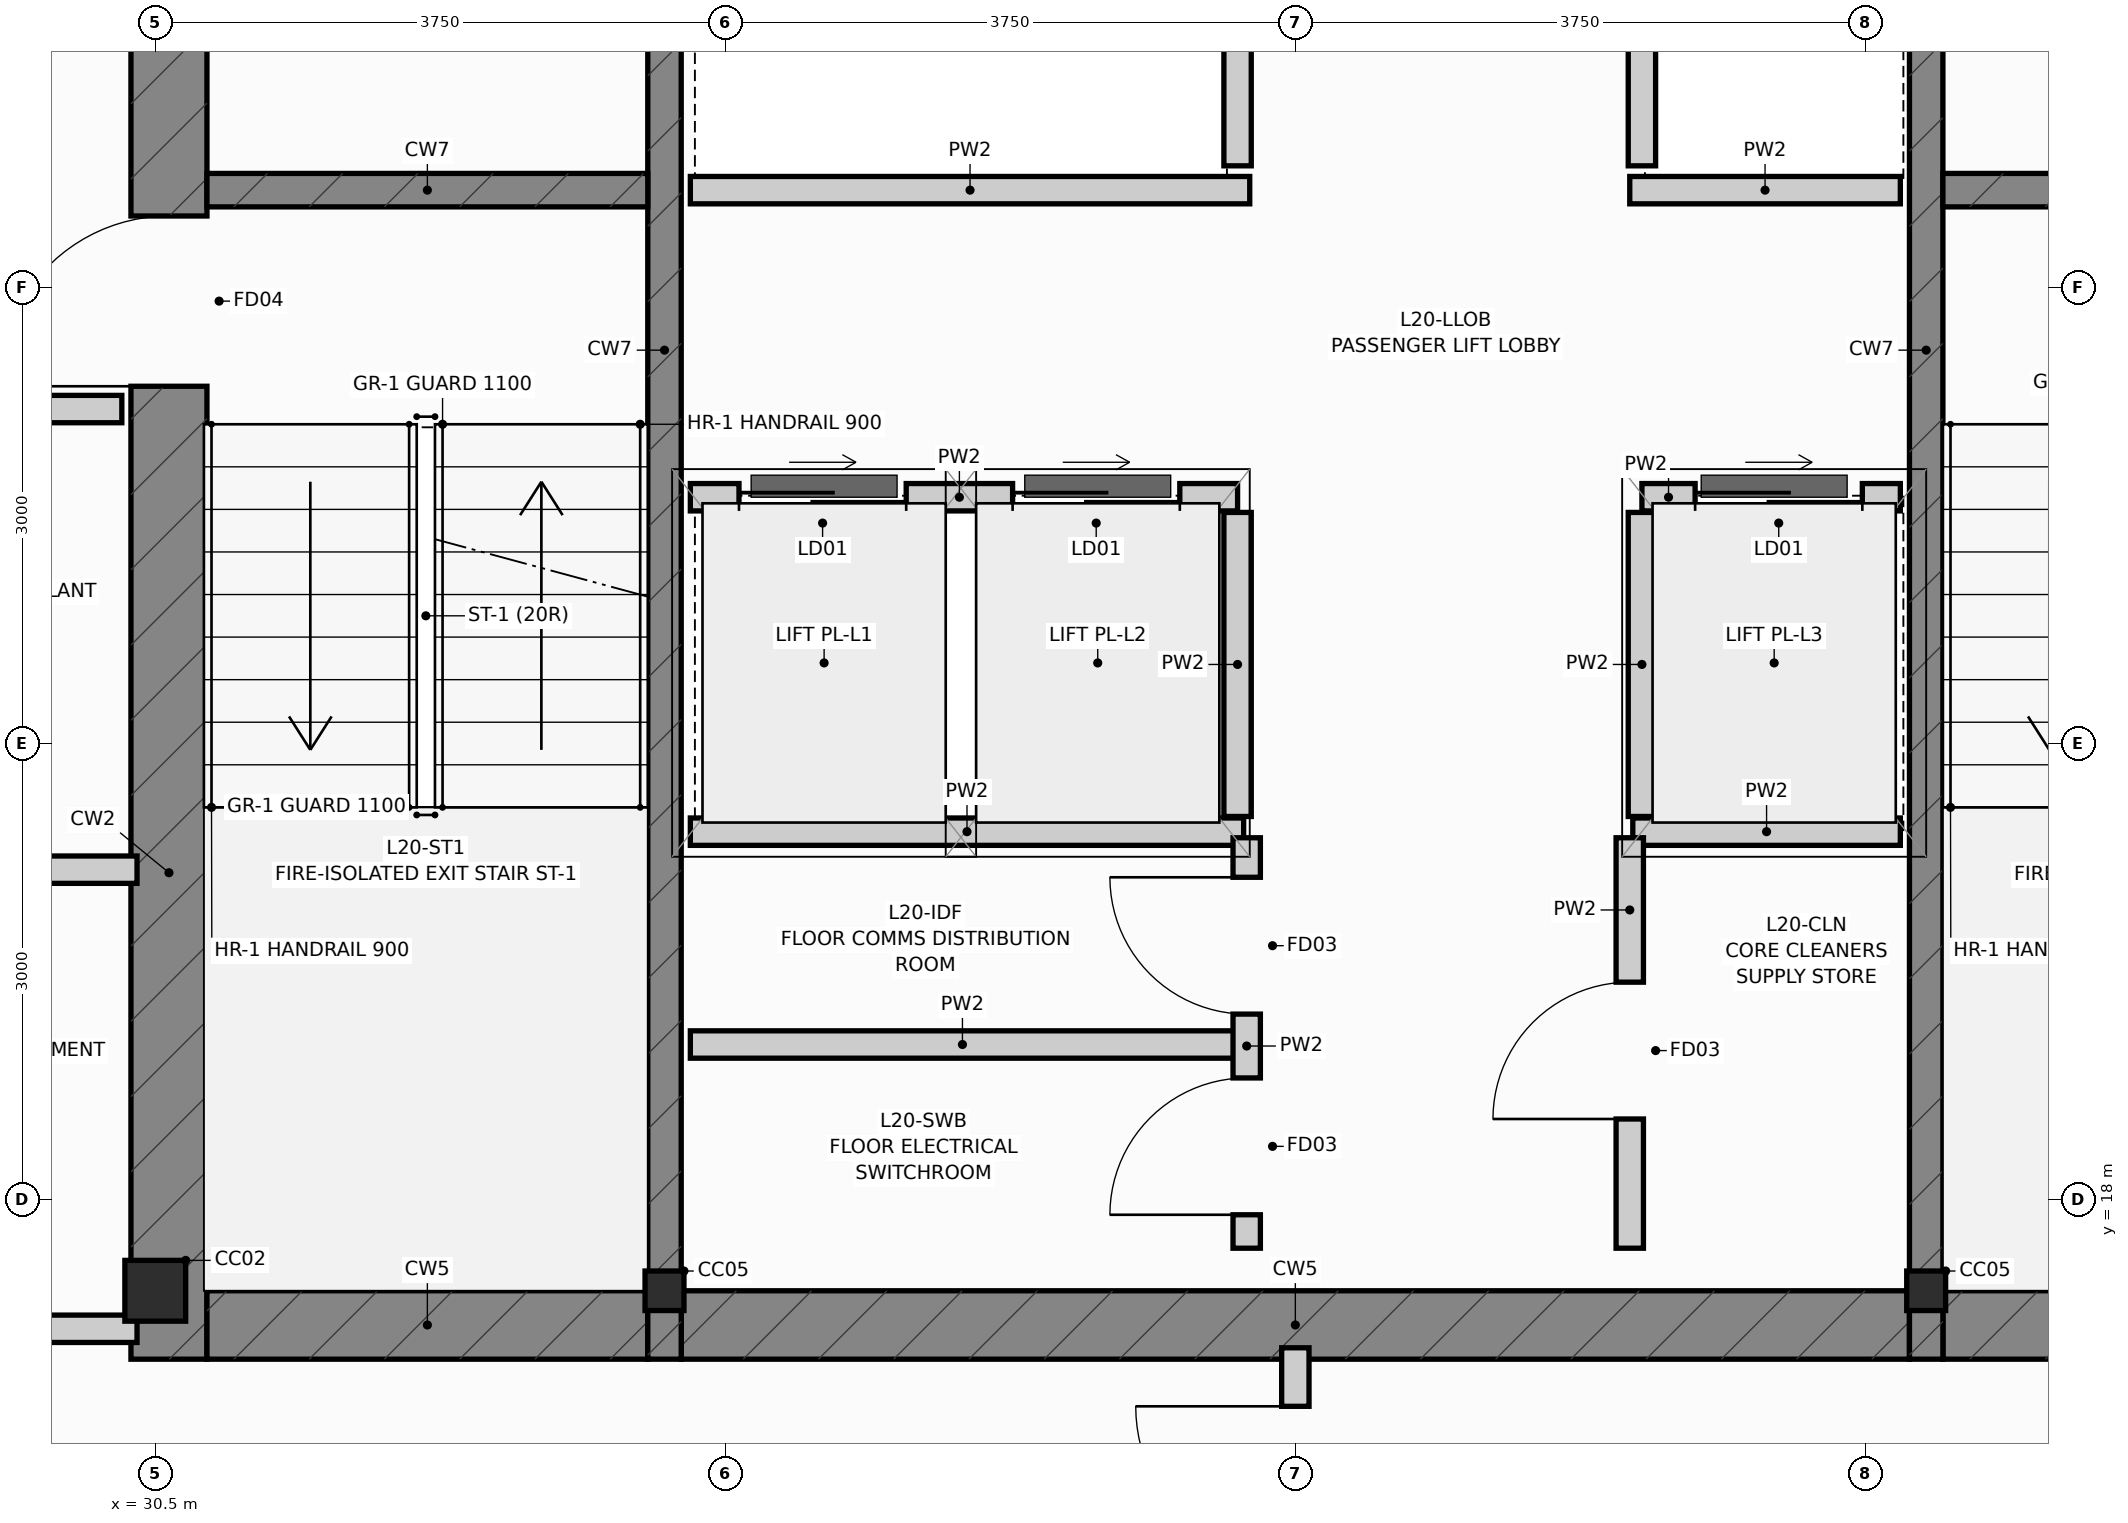
"""IFC4 building model, lengths in metres.
Left out: names, types, materials, properties, quantities, classifications, styles, units other than length and angle.
Written with IfcOpenShell. Run it as: python <this file> out.ifc"""

import sys

from ifc_helpers import new_model, si_unit, direction, frame, frame_2d, origin, origin_2d, place, context, subcontext, project, spatial, rectangle, i_section, extrude, source, transform, mapped, element, fill, save


model = new_model("IFC4")
c1 = context("Model", 3, precision=1e-05, world=origin(), true_north=direction((0.0, 1.0)))
c2 = subcontext(c1, "Body", "Model", "MODEL_VIEW")
j1 = project(units=[si_unit("LENGTHUNIT", "METRE"), si_unit("PLANEANGLEUNIT", "RADIAN")], contexts=[c1])
p1 = place(None, origin())
s1 = spatial("IfcSite", under=j1, at=p1, CompositionType="ELEMENT")
p2 = place(p1, origin())
s2 = spatial("IfcBuilding", under=s1, at=p2, CompositionType="ELEMENT")
p3 = place(p2, frame((0.0, 0.0, 105.4)))
s3 = spatial("IfcBuildingStorey", under=s2, at=p3, CompositionType="ELEMENT", Elevation=105.4)
m1 = source(origin(), c2, "Body", "SweptSolid", [
    extrude(i_section(OverallWidth=0.4, OverallDepth=0.4, WebThickness=0.02, FlangeThickness=0.032, at=origin_2d()), origin(), (0.0, 0.0, 1.0), 3.65),
])
p4 = place(p3, frame((30.5, 17.4, 0.0), z_axis=(0.0, 0.0, 1.0), x_axis=(1.0, 0.0, 0.0)))
e1 = element("IfcColumn", 1, at=p4, inside=s3, PredefinedType="COLUMN", context=c2, shape_type="MappedRepresentation", body=[
    mapped(m1, transform((0.0, 0.0, 0.0), scale=1.0)),
])
m2 = source(origin(), c2, "Body", "SweptSolid", [
    extrude(i_section(OverallWidth=0.256, OverallDepth=0.26, WebThickness=0.01, FlangeThickness=0.017, at=origin_2d()), origin(), (0.0, 0.0, 1.0), 3.65),
])
for number, where, z_axis, x_axis in (
    (2, (33.85, 17.4, 0.0), (0.0, 0.0, 1.0), (1.0, 0.0, 0.0)),
    (3, (42.15, 17.4, 0.0), (0.0, 0.0, 1.0), (1.0, 0.0, 0.0)),
):
    element("IfcColumn", number, at=place(p3, frame(where, z_axis=z_axis, x_axis=x_axis)), inside=s3, PredefinedType="COLUMN", context=c2, shape_type="MappedRepresentation", body=[
        mapped(m2, transform((0.0, 0.0, 0.0), scale=1.0)),
    ])
p5 = place(p3, frame((30.59, 16.95, 0.0), z_axis=(0.0, 0.0, 1.0), x_axis=(0.0, 1.0, 0.0)))
e4 = element("IfcWall", 4, at=p5, inside=s3, PredefinedType="SHEAR", context=c2, shape_type="SweptSolid", body=[
    extrude(rectangle(XDim=13.275, YDim=0.5, at=frame_2d((6.638, 0.0))), origin(), (0.0, 0.0, 1.0), 3.65),
])
p6 = place(p5, frame((6.4, 0.0, 0.0)))
e5 = element("IfcOpeningElement", 5, at=p6, cuts=e4, PredefinedType="OPENING", context=c2, shape_type="SweptSolid", body=[
    extrude(rectangle(XDim=1.12, YDim=2.15, at=frame_2d((0.56, 1.075))), frame((0.0, 0.262, 0.0), z_axis=(0.0, -1.0, 0.0), x_axis=(1.0, 0.0, 0.0)), (0.0, 0.0, 1.0), 0.524),
])
p7 = place(p5, frame((10.85, 0.0, 0.0)))
e6 = element("IfcOpeningElement", 6, at=p7, cuts=e4, PredefinedType="OPENING", context=c2, shape_type="SweptSolid", body=[
    extrude(rectangle(XDim=1.2, YDim=2.2, at=frame_2d((0.6, 1.1))), frame((0.0, 0.262, 0.0), z_axis=(0.0, -1.0, 0.0), x_axis=(1.0, 0.0, 0.0)), (0.0, 0.0, 1.0), 0.524),
])
p8 = place(p3, frame((30.84, 17.175, 0.0), z_axis=(0.0, 0.0, 1.0), x_axis=(1.0, 0.0, 0.0)))
e7 = element("IfcWall", 7, at=p8, inside=s3, PredefinedType="SHEAR", context=c2, shape_type="SweptSolid", body=[
    extrude(rectangle(XDim=2.9, YDim=0.45, at=frame_2d((1.45, 0.0))), origin(), (0.0, 0.0, 1.0), 3.65),
])
p9 = place(p3, frame((33.96, 17.175, 0.0), z_axis=(0.0, 0.0, 1.0), x_axis=(1.0, 0.0, 0.0)))
e8 = element("IfcWall", 8, at=p9, inside=s3, PredefinedType="SHEAR", context=c2, shape_type="SweptSolid", body=[
    extrude(rectangle(XDim=8.08, YDim=0.45, at=frame_2d((4.04, 0.0))), origin(), (0.0, 0.0, 1.0), 3.65),
])
p10 = place(p3, frame((42.26, 17.175, 0.0), z_axis=(0.0, 0.0, 1.0), x_axis=(1.0, 0.0, 0.0)))
e9 = element("IfcWall", 9, at=p10, inside=s3, PredefinedType="SHEAR", context=c2, shape_type="SweptSolid", body=[
    extrude(rectangle(XDim=2.9, YDim=0.45, at=frame_2d((1.45, 0.0))), origin(), (0.0, 0.0, 1.0), 3.65),
])
for number, where, z_axis, x_axis in (
    (10, (33.85, 16.95, 0.0), (0.0, 0.0, 1.0), (0.0, 1.0, 0.0)),
    (11, (42.15, 16.95, 0.0), (0.0, 0.0, 1.0), (0.0, 1.0, 0.0)),
):
    element("IfcWall", number, at=place(p3, frame(where, z_axis=z_axis, x_axis=x_axis)), inside=s3, PredefinedType="SHEAR", context=c2, shape_type="SweptSolid", body=[
        extrude(rectangle(XDim=13.275, YDim=0.22, at=frame_2d((6.638, 0.0))), origin(), (0.0, 0.0, 1.0), 3.65),
    ])
for number, where, z_axis, x_axis in (
    (12, (30.84, 24.64, 0.0), (0.0, 0.0, 1.0), (1.0, 0.0, 0.0)),
    (13, (42.26, 24.64, 0.0), (0.0, 0.0, 1.0), (1.0, 0.0, 0.0)),
):
    element("IfcWall", number, at=place(p3, frame(where, z_axis=z_axis, x_axis=x_axis)), inside=s3, PredefinedType="SHEAR", context=c2, shape_type="SweptSolid", body=[
        extrude(rectangle(XDim=2.9, YDim=0.22, at=frame_2d((1.45, 0.0))), origin(), (0.0, 0.0, 1.0), 3.65),
    ])
p11 = place(p3, frame((34.02, 22.62, 0.0), z_axis=(0.0, 0.0, 1.0), x_axis=(1.0, 0.0, 0.0)))
e14 = element("IfcWall", 14, at=p11, inside=s3, PredefinedType="PARTITIONING", context=c2, shape_type="SweptSolid", body=[
    extrude(rectangle(XDim=3.6, YDim=0.18, at=frame_2d((1.8, 0.0))), origin(), (0.0, 0.0, 1.0), 3.4),
])
p12 = place(p11, frame((0.32, 0.0, 0.0)))
e15 = element("IfcOpeningElement", 15, at=p12, cuts=e14, PredefinedType="OPENING", context=c2, shape_type="SweptSolid", body=[
    extrude(rectangle(XDim=1.1, YDim=2.2, at=frame_2d((0.55, 1.1))), frame((0.0, 0.102, 0.0), z_axis=(0.0, -1.0, 0.0), x_axis=(1.0, 0.0, 0.0)), (0.0, 0.0, 1.0), 0.204),
])
p13 = place(p11, frame((2.12, 0.0, 0.0)))
e16 = element("IfcOpeningElement", 16, at=p13, cuts=e14, PredefinedType="OPENING", context=c2, shape_type="SweptSolid", body=[
    extrude(rectangle(XDim=1.1, YDim=2.2, at=frame_2d((0.55, 1.1))), frame((0.0, 0.102, 0.0), z_axis=(0.0, -1.0, 0.0), x_axis=(1.0, 0.0, 0.0)), (0.0, 0.0, 1.0), 0.204),
])
p14 = place(p3, frame((40.28, 22.62, 0.0), z_axis=(0.0, 0.0, 1.0), x_axis=(1.0, 0.0, 0.0)))
e17 = element("IfcWall", 17, at=p14, inside=s3, PredefinedType="PARTITIONING", context=c2, shape_type="SweptSolid", body=[
    extrude(rectangle(XDim=1.7, YDim=0.18, at=frame_2d((0.85, 0.0))), origin(), (0.0, 0.0, 1.0), 3.4),
])
p15 = place(p14, frame((0.35, 0.0, 0.0)))
e18 = element("IfcOpeningElement", 18, at=p15, cuts=e17, PredefinedType="OPENING", context=c2, shape_type="SweptSolid", body=[
    extrude(rectangle(XDim=1.1, YDim=2.2, at=frame_2d((0.55, 1.1))), frame((0.0, 0.102, 0.0), z_axis=(0.0, -1.0, 0.0), x_axis=(1.0, 0.0, 0.0)), (0.0, 0.0, 1.0), 0.204),
])
for number, where, z_axis, x_axis in (
    (19, (37.62, 20.52, 0.0), (0.0, 0.0, 1.0), (0.0, 1.0, 0.0)),
    (20, (40.28, 20.52, 0.0), (0.0, 0.0, 1.0), (0.0, 1.0, 0.0)),
    (21, (37.62, 24.8, 0.0), (0.0, 0.0, 1.0), (0.0, 1.0, 0.0)),
    (22, (40.28, 24.8, 0.0), (0.0, 0.0, 1.0), (0.0, 1.0, 0.0)),
):
    element("IfcWall", number, at=place(p3, frame(where, z_axis=z_axis, x_axis=x_axis)), inside=s3, PredefinedType="PARTITIONING", context=c2, shape_type="SweptSolid", body=[
        extrude(rectangle(XDim=2.0, YDim=0.18, at=frame_2d((1.0, 0.0))), origin(), (0.0, 0.0, 1.0), 3.4),
    ])
p16 = place(p3, frame((34.02, 24.64, 0.0), z_axis=(0.0, 0.0, 1.0), x_axis=(1.0, 0.0, 0.0)))
e23 = element("IfcWall", 23, at=p16, inside=s3, PredefinedType="PARTITIONING", context=c2, shape_type="SweptSolid", body=[
    extrude(rectangle(XDim=3.68, YDim=0.18, at=frame_2d((1.84, 0.0))), origin(), (0.0, 0.0, 1.0), 3.4),
])
p17 = place(p3, frame((40.2, 24.64, 0.0), z_axis=(0.0, 0.0, 1.0), x_axis=(1.0, 0.0, 0.0)))
e24 = element("IfcWall", 24, at=p17, inside=s3, PredefinedType="PARTITIONING", context=c2, shape_type="SweptSolid", body=[
    extrude(rectangle(XDim=1.78, YDim=0.18, at=frame_2d((0.89, 0.0))), origin(), (0.0, 0.0, 1.0), 3.4),
])
p18 = place(p3, frame((27.52, 23.2, 0.0), z_axis=(0.0, 0.0, 1.0), x_axis=(1.0, 0.0, 0.0)))
e25 = element("IfcWall", 25, at=p18, inside=s3, PredefinedType="PARTITIONING", context=c2, shape_type="SweptSolid", body=[
    extrude(rectangle(XDim=2.76, YDim=0.18, at=frame_2d((1.38, 0.0))), origin(), (0.0, 0.0, 1.0), 3.4),
])
p19 = place(p3, frame((34.02, 20.42, 0.0), z_axis=(0.0, 0.0, 1.0), x_axis=(1.0, 0.0, 0.0)))
e26 = element("IfcWall", 26, at=p19, inside=s3, PredefinedType="PARTITIONING", context=c2, shape_type="SweptSolid", body=[
    extrude(rectangle(XDim=3.64, YDim=0.18, at=frame_2d((1.82, 0.0))), origin(), (0.0, 0.0, 1.0), 3.4),
])
p20 = place(p3, frame((40.22, 20.42, 0.0), z_axis=(0.0, 0.0, 1.0), x_axis=(1.0, 0.0, 0.0)))
e27 = element("IfcWall", 27, at=p20, inside=s3, PredefinedType="PARTITIONING", context=c2, shape_type="SweptSolid", body=[
    extrude(rectangle(XDim=1.76, YDim=0.18, at=frame_2d((0.88, 0.0))), origin(), (0.0, 0.0, 1.0), 3.4),
])
p21 = place(p3, frame((34.02, 19.02, 0.0), z_axis=(0.0, 0.0, 1.0), x_axis=(1.0, 0.0, 0.0)))
e28 = element("IfcWall", 28, at=p21, inside=s3, PredefinedType="PARTITIONING", context=c2, shape_type="SweptSolid", body=[
    extrude(rectangle(XDim=3.58, YDim=0.18, at=frame_2d((1.79, 0.0))), origin(), (0.0, 0.0, 1.0), 3.4),
])
p22 = place(p3, frame((37.68, 17.68, 0.0), z_axis=(0.0, 0.0, 1.0), x_axis=(0.0, 1.0, 0.0)))
e29 = element("IfcWall", 29, at=p22, inside=s3, PredefinedType="PARTITIONING", context=c2, shape_type="SweptSolid", body=[
    extrude(rectangle(XDim=2.7, YDim=0.18, at=frame_2d((1.35, 0.0))), origin(), (0.0, 0.0, 1.0), 3.4),
])
p23 = place(p22, frame((0.22, 0.0, 0.0)))
e30 = element("IfcOpeningElement", 30, at=p23, cuts=e29, PredefinedType="OPENING", context=c2, shape_type="SweptSolid", body=[
    extrude(rectangle(XDim=0.9, YDim=2.1, at=frame_2d((0.45, 1.05))), frame((0.0, 0.102, 0.0), z_axis=(0.0, -1.0, 0.0), x_axis=(1.0, 0.0, 0.0)), (0.0, 0.0, 1.0), 0.204),
])
p24 = place(p22, frame((1.54, 0.0, 0.0)))
e31 = element("IfcOpeningElement", 31, at=p24, cuts=e29, PredefinedType="OPENING", context=c2, shape_type="SweptSolid", body=[
    extrude(rectangle(XDim=0.9, YDim=2.1, at=frame_2d((0.45, 1.05))), frame((0.0, 0.102, 0.0), z_axis=(0.0, -1.0, 0.0), x_axis=(1.0, 0.0, 0.0)), (0.0, 0.0, 1.0), 0.204),
])
p25 = place(p3, frame((40.2, 17.68, 0.0), z_axis=(0.0, 0.0, 1.0), x_axis=(0.0, 1.0, 0.0)))
e32 = element("IfcWall", 32, at=p25, inside=s3, PredefinedType="PARTITIONING", context=c2, shape_type="SweptSolid", body=[
    extrude(rectangle(XDim=2.7, YDim=0.18, at=frame_2d((1.35, 0.0))), origin(), (0.0, 0.0, 1.0), 3.4),
])
p26 = place(p25, frame((0.85, 0.0, 0.0)))
e33 = element("IfcOpeningElement", 33, at=p26, cuts=e32, PredefinedType="OPENING", context=c2, shape_type="SweptSolid", body=[
    extrude(rectangle(XDim=0.9, YDim=2.1, at=frame_2d((0.45, 1.05))), frame((0.0, 0.102, 0.0), z_axis=(0.0, -1.0, 0.0), x_axis=(1.0, 0.0, 0.0)), (0.0, 0.0, 1.0), 0.204),
])
p27 = place(p3, frame((27.48, 20.17, 0.0), z_axis=(0.0, 0.0, 1.0), x_axis=(1.0, 0.0, 0.0)))
e34 = element("IfcWall", 34, at=p27, inside=s3, PredefinedType="PARTITIONING", context=c2, shape_type="SweptSolid", body=[
    extrude(rectangle(XDim=2.9, YDim=0.18, at=frame_2d((1.45, 0.0))), origin(), (0.0, 0.0, 1.0), 3.4),
])
p28 = place(p3, frame((27.48, 17.15, 0.0), z_axis=(0.0, 0.0, 1.0), x_axis=(1.0, 0.0, 0.0)))
e35 = element("IfcWall", 35, at=p28, inside=s3, PredefinedType="PARTITIONING", context=c2, shape_type="SweptSolid", body=[
    extrude(rectangle(XDim=2.9, YDim=0.18, at=frame_2d((1.45, 0.0))), origin(), (0.0, 0.0, 1.0), 2.783),
])
p29 = place(p3, frame((38.0, 15.205, 0.0), z_axis=(0.0, 0.0, 1.0), x_axis=(0.0, 1.0, 0.0)))
e36 = element("IfcWall", 36, at=p29, inside=s3, PredefinedType="PARTITIONING", context=c2, shape_type="SweptSolid", body=[
    extrude(rectangle(XDim=1.82, YDim=0.18, at=frame_2d((0.91, 0.0))), origin(), (0.0, 0.0, 1.0), 3.4),
])
p30 = place(p29, frame((0.385, 0.0, 0.0)))
e37 = element("IfcOpeningElement", 37, at=p30, cuts=e36, PredefinedType="OPENING", context=c2, shape_type="SweptSolid", body=[
    extrude(rectangle(XDim=1.05, YDim=2.15, at=frame_2d((0.525, 1.075))), frame((0.0, 0.102, 0.0), z_axis=(0.0, -1.0, 0.0), x_axis=(1.0, 0.0, 0.0)), (0.0, 0.0, 1.0), 0.204),
])
p31 = place(p6, origin())
e38 = element("IfcDoor", 38, at=p31, inside=s3, OperationType="SINGLE_SWING_LEFT", PredefinedType="DOOR", context=c2, shape_type="SweptSolid", body=[
    extrude(rectangle(XDim=1.12, YDim=2.15, at=frame_2d((0.56, 1.075))), frame((0.0, 0.025, 0.0), z_axis=(0.0, -1.0, 0.0), x_axis=(1.0, 0.0, 0.0)), (0.0, 0.0, 1.0), 0.05),
])
fill(e5, e38)
p32 = place(p12, origin())
e39 = element("IfcDoor", 39, at=p32, inside=s3, OperationType="SLIDING_TO_LEFT", PredefinedType="DOOR", context=c2, shape_type="SweptSolid", body=[
    extrude(rectangle(XDim=1.1, YDim=2.2, at=frame_2d((0.55, 1.1))), frame((0.0, 0.025, 0.0), z_axis=(0.0, -1.0, 0.0), x_axis=(1.0, 0.0, 0.0)), (0.0, 0.0, 1.0), 0.05),
])
fill(e15, e39)
p33 = place(p13, origin())
e40 = element("IfcDoor", 40, at=p33, inside=s3, OperationType="SLIDING_TO_RIGHT", PredefinedType="DOOR", context=c2, shape_type="SweptSolid", body=[
    extrude(rectangle(XDim=1.1, YDim=2.2, at=frame_2d((0.55, 1.1))), frame((0.0, 0.025, 0.0), z_axis=(0.0, -1.0, 0.0), x_axis=(1.0, 0.0, 0.0)), (0.0, 0.0, 1.0), 0.05),
])
fill(e16, e40)
p34 = place(p15, origin())
e41 = element("IfcDoor", 41, at=p34, inside=s3, OperationType="SLIDING_TO_LEFT", PredefinedType="DOOR", context=c2, shape_type="SweptSolid", body=[
    extrude(rectangle(XDim=1.1, YDim=2.2, at=frame_2d((0.55, 1.1))), frame((0.0, 0.025, 0.0), z_axis=(0.0, -1.0, 0.0), x_axis=(1.0, 0.0, 0.0)), (0.0, 0.0, 1.0), 0.05),
])
fill(e18, e41)
p35 = place(p23, origin())
e42 = element("IfcDoor", 42, at=p35, inside=s3, OperationType="SINGLE_SWING_LEFT", PredefinedType="DOOR", context=c2, shape_type="SweptSolid", body=[
    extrude(rectangle(XDim=0.9, YDim=2.1, at=frame_2d((0.45, 1.05))), frame((0.0, 0.025, 0.0), z_axis=(0.0, -1.0, 0.0), x_axis=(1.0, 0.0, 0.0)), (0.0, 0.0, 1.0), 0.05),
])
fill(e30, e42)
p36 = place(p24, origin())
e43 = element("IfcDoor", 43, at=p36, inside=s3, OperationType="SINGLE_SWING_RIGHT", PredefinedType="DOOR", context=c2, shape_type="SweptSolid", body=[
    extrude(rectangle(XDim=0.9, YDim=2.1, at=frame_2d((0.45, 1.05))), frame((0.0, 0.025, 0.0), z_axis=(0.0, -1.0, 0.0), x_axis=(1.0, 0.0, 0.0)), (0.0, 0.0, 1.0), 0.05),
])
fill(e31, e43)
p37 = place(p26, origin())
e44 = element("IfcDoor", 44, at=p37, inside=s3, OperationType="SINGLE_SWING_LEFT", PredefinedType="DOOR", context=c2, shape_type="SweptSolid", body=[
    extrude(rectangle(XDim=0.9, YDim=2.1, at=frame_2d((0.45, 1.05))), frame((0.0, 0.025, 0.0), z_axis=(0.0, -1.0, 0.0), x_axis=(1.0, 0.0, 0.0)), (0.0, 0.0, 1.0), 0.05),
])
fill(e33, e44)
p38 = place(p30, origin())
e45 = element("IfcDoor", 45, at=p38, inside=s3, OperationType="SINGLE_SWING_RIGHT", PredefinedType="DOOR", context=c2, shape_type="SweptSolid", body=[
    extrude(rectangle(XDim=1.05, YDim=2.15, at=frame_2d((0.525, 1.075))), frame((0.0, 0.025, 0.0), z_axis=(0.0, -1.0, 0.0), x_axis=(1.0, 0.0, 0.0)), (0.0, 0.0, 1.0), 0.05),
])
fill(e37, e45)
save(model, sys.argv[1])
